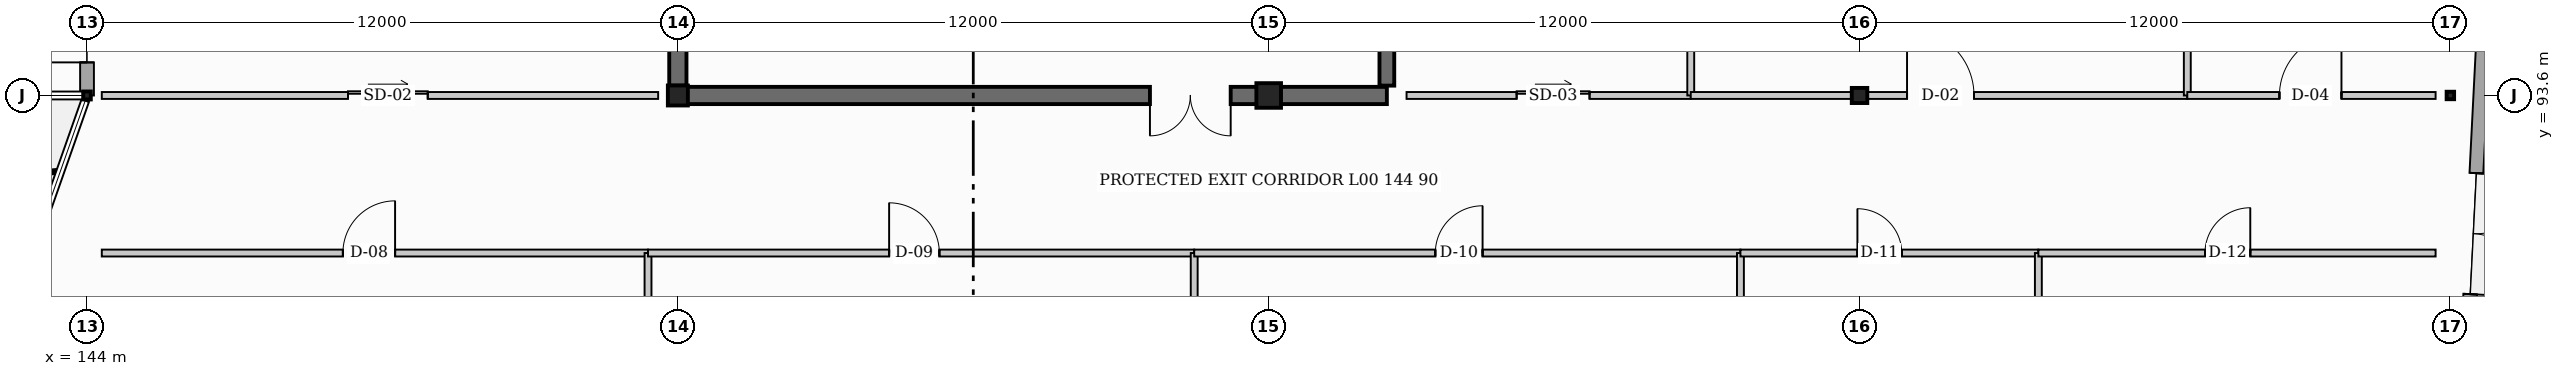
"""IFC4 building model, lengths in metres.
Left out: names, types, materials, properties, quantities, classifications, styles, units other than length and angle.
Written with IfcOpenShell. Run it as: python <this file> out.ifc"""

import sys

from ifc_helpers import new_model, si_unit, direction, frame, frame_2d, origin, origin_2d, place, context, subcontext, project, spatial, rectangle, hollow_circle, i_section, extrude, element, fill, save


model = new_model("IFC4")
c1 = context("Model", 3, precision=1e-05, world=origin(), true_north=direction((0.0, 1.0)))
c2 = subcontext(c1, "Body", "Model", "MODEL_VIEW")
j1 = project(units=[si_unit("LENGTHUNIT", "METRE"), si_unit("PLANEANGLEUNIT", "RADIAN")], contexts=[c1])
p1 = place(None, origin())
s1 = spatial("IfcSite", under=j1, at=p1, CompositionType="ELEMENT")
p2 = place(p1, origin())
s2 = spatial("IfcBuilding", under=s1, at=p2, CompositionType="ELEMENT")
p3 = place(p2, origin())
s3 = spatial("IfcBuildingStorey", under=s2, at=p3, CompositionType="ELEMENT", Elevation=0.0)
p4 = place(p3, frame((144.0, 93.6, 0.0), z_axis=(0.0, 0.0, 1.0), x_axis=(1.0, 0.0, 0.0)))
e1 = element("IfcColumn", 1, at=p4, inside=s3, PredefinedType="COLUMN", context=c2, shape_type="SweptSolid", body=[
    extrude(i_section(OverallWidth=0.154, OverallDepth=0.162, WebThickness=0.008, FlangeThickness=0.011, at=origin_2d()), origin(), (0.0, 0.0, 1.0), 4.8),
])
p5 = place(p3, frame((156.0, 93.6, 0.0), z_axis=(0.0, 0.0, 1.0), x_axis=(0.0, 1.0, 0.0)))
e2 = element("IfcColumn", 2, at=p5, inside=s3, PredefinedType="COLUMN", context=c2, shape_type="SweptSolid", body=[
    extrude(hollow_circle(Radius=0.203, WallThickness=0.016, at=origin_2d()), origin(), (0.0, 0.0, 1.0), 4.8),
])
p6 = place(p3, frame((168.0, 93.6, 0.0), z_axis=(0.0, 0.0, 1.0), x_axis=(1.0, 0.0, 0.0)))
e3 = element("IfcColumn", 3, at=p6, inside=s3, PredefinedType="COLUMN", context=c2, shape_type="SweptSolid", body=[
    extrude(rectangle(XDim=0.5, YDim=0.5, at=origin_2d()), origin(), (0.0, 0.0, 1.0), 4.8),
])
p7 = place(p3, frame((180.0, 93.6, 0.0), z_axis=(0.0, 0.0, 1.0), x_axis=(0.0, 1.0, 0.0)))
e4 = element("IfcColumn", 4, at=p7, inside=s3, PredefinedType="COLUMN", context=c2, shape_type="SweptSolid", body=[
    extrude(i_section(OverallWidth=0.307, OverallDepth=0.315, WebThickness=0.012, FlangeThickness=0.019, at=origin_2d()), origin(), (0.0, 0.0, 1.0), 4.8),
])
p8 = place(p3, frame((192.0, 93.6, 0.0), z_axis=(0.0, 0.0, 1.0), x_axis=(1.0, 0.0, 0.0)))
e5 = element("IfcColumn", 5, at=p8, inside=s3, PredefinedType="COLUMN", context=c2, shape_type="SweptSolid", body=[
    extrude(i_section(OverallWidth=0.152, OverallDepth=0.152, WebThickness=0.006, FlangeThickness=0.007, at=origin_2d()), origin(), (0.0, 0.0, 1.0), 4.8),
])
p9 = place(p3, frame((170.4, 93.6, 0.0), z_axis=(0.0, 0.0, 1.0), x_axis=(-1.0, 0.0, 0.0)))
e6 = element("IfcWall", 6, at=p9, inside=s3, PredefinedType="SHEAR", context=c2, shape_type="SweptSolid", body=[
    extrude(rectangle(XDim=14.4, YDim=0.35, at=frame_2d((7.2, 0.0))), origin(), (0.0, 0.0, 1.0), 4.8),
])
p10 = place(p9, frame((3.172, 0.0, 0.0)))
e7 = element("IfcOpeningElement", 7, at=p10, cuts=e6, PredefinedType="OPENING", context=c2, shape_type="SweptSolid", body=[
    extrude(rectangle(XDim=1.64, YDim=2.2, at=frame_2d((0.82, 1.1))), frame((0.0, 0.185, 0.0), z_axis=(0.0, -1.0, 0.0), x_axis=(1.0, 0.0, 0.0)), (0.0, 0.0, 1.0), 0.37),
])
p11 = place(p3, frame((156.0, 93.8, 0.0), z_axis=(0.0, 0.0, 1.0), x_axis=(0.0, 1.0, 0.0)))
e8 = element("IfcWall", 8, at=p11, inside=s3, PredefinedType="SHEAR", context=c2, shape_type="SweptSolid", body=[
    extrude(rectangle(XDim=8.0, YDim=0.35, at=frame_2d((4.0, 0.0))), origin(), (0.0, 0.0, 1.0), 4.8),
])
p12 = place(p3, frame((170.4, 101.8, 0.0), z_axis=(0.0, 0.0, 1.0), x_axis=(0.0, -1.0, 0.0)))
e9 = element("IfcWall", 9, at=p12, inside=s3, PredefinedType="SHEAR", context=c2, shape_type="SweptSolid", body=[
    extrude(rectangle(XDim=8.0, YDim=0.3, at=frame_2d((4.0, 0.0))), origin(), (0.0, 0.0, 1.0), 4.8),
])
p13 = place(p3, frame((193.4, 109.2, 0.0), z_axis=(0.0, 0.0, 1.0), x_axis=(-0.050656249881, -0.998716148036, 0.0)))
e10 = element("IfcWall", 10, at=p13, inside=s3, PredefinedType="STANDARD", context=c2, shape_type="SweptSolid", body=[
    extrude(rectangle(XDim=27.635, YDim=0.28, at=frame_2d((13.818, 0.0))), origin(), (0.0, 0.0, 1.0), 3.973),
])
p14 = place(p13, frame((17.2, 0.0, 0.0)))
e11 = element("IfcOpeningElement", 11, at=p14, cuts=e10, PredefinedType="OPENING", context=c2, shape_type="SweptSolid", body=[
    extrude(rectangle(XDim=2.46, YDim=2.4, at=frame_2d((1.23, 1.2))), frame((0.0, 0.15, 0.0), z_axis=(0.0, -1.0, 0.0), x_axis=(1.0, 0.0, 0.0)), (0.0, 0.0, 1.0), 0.3),
])
p15 = place(p13, frame((1.1, 0.0, 0.95)))
e12 = element("IfcOpeningElement", 12, at=p15, cuts=e10, PredefinedType="OPENING", context=c2, shape_type="SweptSolid", body=[
    extrude(rectangle(XDim=0.9, YDim=1.8, at=frame_2d((0.45, 0.9))), frame((0.0, 0.15, 0.0), z_axis=(0.0, -1.0, 0.0), x_axis=(1.0, 0.0, 0.0)), (0.0, 0.0, 1.0), 0.3),
])
p16 = place(p13, frame((4.7, 0.0, 0.95)))
e13 = element("IfcOpeningElement", 13, at=p16, cuts=e10, PredefinedType="OPENING", context=c2, shape_type="SweptSolid", body=[
    extrude(rectangle(XDim=0.9, YDim=1.8, at=frame_2d((0.45, 0.9))), frame((0.0, 0.15, 0.0), z_axis=(0.0, -1.0, 0.0), x_axis=(1.0, 0.0, 0.0)), (0.0, 0.0, 1.0), 0.3),
])
p17 = place(p13, frame((8.3, 0.0, 0.95)))
e14 = element("IfcOpeningElement", 14, at=p17, cuts=e10, PredefinedType="OPENING", context=c2, shape_type="SweptSolid", body=[
    extrude(rectangle(XDim=0.9, YDim=1.8, at=frame_2d((0.45, 0.9))), frame((0.0, 0.15, 0.0), z_axis=(0.0, -1.0, 0.0), x_axis=(1.0, 0.0, 0.0)), (0.0, 0.0, 1.0), 0.3),
])
p18 = place(p13, frame((11.9, 0.0, 0.95)))
e15 = element("IfcOpeningElement", 15, at=p18, cuts=e10, PredefinedType="OPENING", context=c2, shape_type="SweptSolid", body=[
    extrude(rectangle(XDim=0.9, YDim=1.8, at=frame_2d((0.45, 0.9))), frame((0.0, 0.15, 0.0), z_axis=(0.0, -1.0, 0.0), x_axis=(1.0, 0.0, 0.0)), (0.0, 0.0, 1.0), 0.3),
])
p19 = place(p13, frame((22.7, 0.0, 0.95)))
e16 = element("IfcOpeningElement", 16, at=p19, cuts=e10, PredefinedType="OPENING", context=c2, shape_type="SweptSolid", body=[
    extrude(rectangle(XDim=0.9, YDim=1.8, at=frame_2d((0.45, 0.9))), frame((0.0, 0.15, 0.0), z_axis=(0.0, -1.0, 0.0), x_axis=(1.0, 0.0, 0.0)), (0.0, 0.0, 1.0), 0.3),
])
p20 = place(p3, frame((144.0, 93.6, 0.0), z_axis=(0.0, 0.0, 1.0), x_axis=(0.0, 1.0, 0.0)))
e17 = element("IfcWall", 17, at=p20, inside=s3, PredefinedType="STANDARD", context=c2, shape_type="SweptSolid", body=[
    extrude(rectangle(XDim=21.6, YDim=0.28, at=frame_2d((10.8, 0.0))), origin(), (0.0, 0.0, 1.0), 3.48),
])
p21 = place(p20, frame((0.672, 0.0, 0.0)))
e18 = element("IfcOpeningElement", 18, at=p21, cuts=e17, PredefinedType="OPENING", context=c2, shape_type="SweptSolid", body=[
    extrude(rectangle(XDim=2.3, YDim=2.3, at=frame_2d((1.15, 1.15))), frame((0.0, 0.15, 0.0), z_axis=(0.0, -1.0, 0.0), x_axis=(1.0, 0.0, 0.0)), (0.0, 0.0, 1.0), 0.3),
])
p22 = place(p3, frame((144.3, 90.4, 0.0), z_axis=(0.0, 0.0, 1.0), x_axis=(1.0, 0.0, 0.0)))
e19 = element("IfcWall", 19, at=p22, inside=s3, PredefinedType="PARTITIONING", context=c2, shape_type="SweptSolid", body=[
    extrude(rectangle(XDim=11.094, YDim=0.14, at=frame_2d((5.547, 0.0))), origin(), (0.0, 0.0, 1.0), 3.973),
])
p23 = place(p22, frame((4.897, 0.0, 0.0)))
e20 = element("IfcOpeningElement", 20, at=p23, cuts=e19, PredefinedType="OPENING", context=c2, shape_type="SweptSolid", body=[
    extrude(rectangle(XDim=1.06, YDim=2.1, at=frame_2d((0.53, 1.05))), frame((0.0, 0.08, 0.0), z_axis=(0.0, -1.0, 0.0), x_axis=(1.0, 0.0, 0.0)), (0.0, 0.0, 1.0), 0.16),
])
p24 = place(p3, frame((155.394, 87.65, 0.0), z_axis=(0.0, 0.0, 1.0), x_axis=(0.0, 1.0, 0.0)))
e21 = element("IfcWall", 21, at=p24, inside=s3, PredefinedType="PARTITIONING", context=c2, shape_type="SweptSolid", body=[
    extrude(rectangle(XDim=2.75, YDim=0.14, at=frame_2d((1.375, 0.0))), origin(), (0.0, 0.0, 1.0), 4.445),
])
p25 = place(p3, frame((155.394, 90.4, 0.0), z_axis=(0.0, 0.0, 1.0), x_axis=(1.0, 0.0, 0.0)))
e22 = element("IfcWall", 22, at=p25, inside=s3, PredefinedType="PARTITIONING", context=c2, shape_type="SweptSolid", body=[
    extrude(rectangle(XDim=11.093, YDim=0.14, at=frame_2d((5.546, 0.0))), origin(), (0.0, 0.0, 1.0), 4.445),
])
p26 = place(p25, frame((4.897, 0.0, 0.0)))
e23 = element("IfcOpeningElement", 23, at=p26, cuts=e22, PredefinedType="OPENING", context=c2, shape_type="SweptSolid", body=[
    extrude(rectangle(XDim=1.02, YDim=2.08, at=frame_2d((0.51, 1.04))), frame((0.0, 0.08, 0.0), z_axis=(0.0, -1.0, 0.0), x_axis=(1.0, 0.0, 0.0)), (0.0, 0.0, 1.0), 0.16),
])
p27 = place(p3, frame((166.487, 81.9, 0.0), z_axis=(0.0, 0.0, 1.0), x_axis=(0.0, 1.0, 0.0)))
e24 = element("IfcWall", 24, at=p27, inside=s3, PredefinedType="PARTITIONING", context=c2, shape_type="SweptSolid", body=[
    extrude(rectangle(XDim=8.5, YDim=0.14, at=frame_2d((4.25, 0.0))), origin(), (0.0, 0.0, 1.0), 3.902),
])
p28 = place(p3, frame((166.487, 90.4, 0.0), z_axis=(0.0, 0.0, 1.0), x_axis=(1.0, 0.0, 0.0)))
e25 = element("IfcWall", 25, at=p28, inside=s3, PredefinedType="PARTITIONING", context=c2, shape_type="SweptSolid", body=[
    extrude(rectangle(XDim=11.094, YDim=0.14, at=frame_2d((5.547, 0.0))), origin(), (0.0, 0.0, 1.0), 3.48),
])
p29 = place(p28, frame((4.897, 0.0, 0.0)))
e26 = element("IfcOpeningElement", 26, at=p29, cuts=e25, PredefinedType="OPENING", context=c2, shape_type="SweptSolid", body=[
    extrude(rectangle(XDim=0.96, YDim=2.06, at=frame_2d((0.48, 1.03))), frame((0.0, 0.08, 0.0), z_axis=(0.0, -1.0, 0.0), x_axis=(1.0, 0.0, 0.0)), (0.0, 0.0, 1.0), 0.16),
])
p30 = place(p3, frame((177.581, 81.9, 0.0), z_axis=(0.0, 0.0, 1.0), x_axis=(0.0, 1.0, 0.0)))
e27 = element("IfcWall", 27, at=p30, inside=s3, PredefinedType="PARTITIONING", context=c2, shape_type="SweptSolid", body=[
    extrude(rectangle(XDim=8.5, YDim=0.14, at=frame_2d((4.25, 0.0))), origin(), (0.0, 0.0, 1.0), 3.97),
])
p31 = place(p3, frame((177.581, 90.4, 0.0), z_axis=(0.0, 0.0, 1.0), x_axis=(1.0, 0.0, 0.0)))
e28 = element("IfcWall", 28, at=p31, inside=s3, PredefinedType="PARTITIONING", context=c2, shape_type="SweptSolid", body=[
    extrude(rectangle(XDim=6.051, YDim=0.14, at=frame_2d((3.025, 0.0))), origin(), (0.0, 0.0, 1.0), 3.53),
])
p32 = place(p31, frame((2.376, 0.0, 0.0)))
e29 = element("IfcOpeningElement", 29, at=p32, cuts=e28, PredefinedType="OPENING", context=c2, shape_type="SweptSolid", body=[
    extrude(rectangle(XDim=0.9, YDim=2.1, at=frame_2d((0.45, 1.05))), frame((0.0, 0.08, 0.0), z_axis=(0.0, -1.0, 0.0), x_axis=(1.0, 0.0, 0.0)), (0.0, 0.0, 1.0), 0.16),
])
p33 = place(p3, frame((183.632, 81.9, 0.0), z_axis=(0.0, 0.0, 1.0), x_axis=(0.0, 1.0, 0.0)))
e30 = element("IfcWall", 30, at=p33, inside=s3, PredefinedType="PARTITIONING", context=c2, shape_type="SweptSolid", body=[
    extrude(rectangle(XDim=8.5, YDim=0.14, at=frame_2d((4.25, 0.0))), origin(), (0.0, 0.0, 1.0), 3.973),
])
p34 = place(p3, frame((183.632, 90.4, 0.0), z_axis=(0.0, 0.0, 1.0), x_axis=(1.0, 0.0, 0.0)))
e31 = element("IfcWall", 31, at=p34, inside=s3, PredefinedType="PARTITIONING", context=c2, shape_type="SweptSolid", body=[
    extrude(rectangle(XDim=8.068, YDim=0.14, at=frame_2d((4.034, 0.0))), origin(), (0.0, 0.0, 1.0), 4.18),
])
p35 = place(p34, frame((3.384, 0.0, 0.0)))
e32 = element("IfcOpeningElement", 32, at=p35, cuts=e31, PredefinedType="OPENING", context=c2, shape_type="SweptSolid", body=[
    extrude(rectangle(XDim=0.92, YDim=2.04, at=frame_2d((0.46, 1.02))), frame((0.0, 0.08, 0.0), z_axis=(0.0, -1.0, 0.0), x_axis=(1.0, 0.0, 0.0)), (0.0, 0.0, 1.0), 0.16),
])
p36 = place(p3, frame((144.3, 93.6, 0.0), z_axis=(0.0, 0.0, 1.0), x_axis=(1.0, 0.0, 0.0)))
e33 = element("IfcWall", 33, at=p36, inside=s3, PredefinedType="PARTITIONING", context=c2, shape_type="SweptSolid", body=[
    extrude(rectangle(XDim=11.3, YDim=0.14, at=frame_2d((5.65, 0.0))), origin(), (0.0, 0.0, 1.0), 3.897),
])
p37 = place(p36, frame((5.0, 0.0, 0.0)))
e34 = element("IfcOpeningElement", 34, at=p37, cuts=e33, PredefinedType="OPENING", context=c2, shape_type="SweptSolid", body=[
    extrude(rectangle(XDim=1.62, YDim=2.3, at=frame_2d((0.81, 1.15))), frame((0.0, 0.08, 0.0), z_axis=(0.0, -1.0, 0.0), x_axis=(1.0, 0.0, 0.0)), (0.0, 0.0, 1.0), 0.16),
])
p38 = place(p3, frame((170.8, 93.6, 0.0), z_axis=(0.0, 0.0, 1.0), x_axis=(1.0, 0.0, 0.0)))
e35 = element("IfcWall", 35, at=p38, inside=s3, PredefinedType="PARTITIONING", context=c2, shape_type="SweptSolid", body=[
    extrude(rectangle(XDim=5.772, YDim=0.14, at=frame_2d((2.886, 0.0))), origin(), (0.0, 0.0, 1.0), 3.973),
])
p39 = place(p38, frame((2.236, 0.0, 0.0)))
e36 = element("IfcOpeningElement", 36, at=p39, cuts=e35, PredefinedType="OPENING", context=c2, shape_type="SweptSolid", body=[
    extrude(rectangle(XDim=1.48, YDim=2.26, at=frame_2d((0.74, 1.13))), frame((0.0, 0.08, 0.0), z_axis=(0.0, -1.0, 0.0), x_axis=(1.0, 0.0, 0.0)), (0.0, 0.0, 1.0), 0.16),
])
p40 = place(p3, frame((176.572, 93.6, 0.0), z_axis=(0.0, 0.0, 1.0), x_axis=(0.0, 1.0, 0.0)))
e37 = element("IfcWall", 37, at=p40, inside=s3, PredefinedType="PARTITIONING", context=c2, shape_type="SweptSolid", body=[
    extrude(rectangle(XDim=32.1, YDim=0.14, at=frame_2d((16.05, 0.0))), origin(), (0.0, 0.0, 1.0), 3.48),
])
p41 = place(p3, frame((176.572, 93.6, 0.0), z_axis=(0.0, 0.0, 1.0), x_axis=(1.0, 0.0, 0.0)))
e38 = element("IfcWall", 38, at=p41, inside=s3, PredefinedType="PARTITIONING", context=c2, shape_type="SweptSolid", body=[
    extrude(rectangle(XDim=10.085, YDim=0.14, at=frame_2d((5.042, 0.0))), origin(), (0.0, 0.0, 1.0), 3.53),
])
p42 = place(p41, frame((4.393, 0.0, 0.0)))
e39 = element("IfcOpeningElement", 39, at=p42, cuts=e38, PredefinedType="OPENING", context=c2, shape_type="SweptSolid", body=[
    extrude(rectangle(XDim=1.36, YDim=2.18, at=frame_2d((0.68, 1.09))), frame((0.0, 0.08, 0.0), z_axis=(0.0, -1.0, 0.0), x_axis=(1.0, 0.0, 0.0)), (0.0, 0.0, 1.0), 0.16),
])
p43 = place(p3, frame((186.657, 93.6, 0.0), z_axis=(0.0, 0.0, 1.0), x_axis=(0.0, 1.0, 0.0)))
e40 = element("IfcWall", 40, at=p43, inside=s3, PredefinedType="PARTITIONING", context=c2, shape_type="SweptSolid", body=[
    extrude(rectangle(XDim=32.1, YDim=0.14, at=frame_2d((16.05, 0.0))), origin(), (0.0, 0.0, 1.0), 3.48),
])
p44 = place(p3, frame((186.657, 93.6, 0.0), z_axis=(0.0, 0.0, 1.0), x_axis=(1.0, 0.0, 0.0)))
e41 = element("IfcWall", 41, at=p44, inside=s3, PredefinedType="PARTITIONING", context=c2, shape_type="SweptSolid", body=[
    extrude(rectangle(XDim=5.043, YDim=0.14, at=frame_2d((2.521, 0.0))), origin(), (0.0, 0.0, 1.0), 3.976),
])
p45 = place(p44, frame((1.871, 0.0, 0.0)))
e42 = element("IfcOpeningElement", 42, at=p45, cuts=e41, PredefinedType="OPENING", context=c2, shape_type="SweptSolid", body=[
    extrude(rectangle(XDim=1.26, YDim=2.14, at=frame_2d((0.63, 1.07))), frame((0.0, 0.08, 0.0), z_axis=(0.0, -1.0, 0.0), x_axis=(1.0, 0.0, 0.0)), (0.0, 0.0, 1.0), 0.16),
])
p46 = place(p14, origin())
e43 = element("IfcDoor", 43, at=p46, inside=s3, OperationType="DOUBLE_DOOR_SINGLE_SWING", PredefinedType="DOOR", context=c2, shape_type="SweptSolid", body=[
    extrude(rectangle(XDim=2.46, YDim=2.4, at=frame_2d((1.23, 1.2))), frame((0.0, 0.025, 0.0), z_axis=(0.0, -1.0, 0.0), x_axis=(1.0, 0.0, 0.0)), (0.0, 0.0, 1.0), 0.05),
])
fill(e11, e43)
p47 = place(p21, origin())
e44 = element("IfcDoor", 44, at=p47, inside=s3, OperationType="DOUBLE_DOOR_SINGLE_SWING", PredefinedType="DOOR", context=c2, shape_type="SweptSolid", body=[
    extrude(rectangle(XDim=2.3, YDim=2.3, at=frame_2d((1.15, 1.15))), frame((0.0, 0.025, 0.0), z_axis=(0.0, -1.0, 0.0), x_axis=(1.0, 0.0, 0.0)), (0.0, 0.0, 1.0), 0.05),
])
fill(e18, e44)
p48 = place(p10, origin())
e45 = element("IfcDoor", 45, at=p48, inside=s3, OperationType="DOUBLE_DOOR_SINGLE_SWING", PredefinedType="DOOR", context=c2, shape_type="SweptSolid", body=[
    extrude(rectangle(XDim=1.64, YDim=2.2, at=frame_2d((0.82, 1.1))), frame((0.0, 0.025, 0.0), z_axis=(0.0, -1.0, 0.0), x_axis=(1.0, 0.0, 0.0)), (0.0, 0.0, 1.0), 0.05),
])
fill(e7, e45)
p49 = place(p23, origin())
e46 = element("IfcDoor", 46, at=p49, inside=s3, OperationType="SINGLE_SWING_RIGHT", PredefinedType="DOOR", context=c2, shape_type="SweptSolid", body=[
    extrude(rectangle(XDim=1.06, YDim=2.1, at=frame_2d((0.53, 1.05))), frame((0.0, 0.025, 0.0), z_axis=(0.0, -1.0, 0.0), x_axis=(1.0, 0.0, 0.0)), (0.0, 0.0, 1.0), 0.05),
])
fill(e20, e46)
p50 = place(p26, origin())
e47 = element("IfcDoor", 47, at=p50, inside=s3, OperationType="SINGLE_SWING_LEFT", PredefinedType="DOOR", context=c2, shape_type="SweptSolid", body=[
    extrude(rectangle(XDim=1.02, YDim=2.08, at=frame_2d((0.51, 1.04))), frame((0.0, 0.025, 0.0), z_axis=(0.0, -1.0, 0.0), x_axis=(1.0, 0.0, 0.0)), (0.0, 0.0, 1.0), 0.05),
])
fill(e23, e47)
p51 = place(p29, origin())
e48 = element("IfcDoor", 48, at=p51, inside=s3, OperationType="SINGLE_SWING_RIGHT", PredefinedType="DOOR", context=c2, shape_type="SweptSolid", body=[
    extrude(rectangle(XDim=0.96, YDim=2.06, at=frame_2d((0.48, 1.03))), frame((0.0, 0.025, 0.0), z_axis=(0.0, -1.0, 0.0), x_axis=(1.0, 0.0, 0.0)), (0.0, 0.0, 1.0), 0.05),
])
fill(e26, e48)
p52 = place(p32, origin())
e49 = element("IfcDoor", 49, at=p52, inside=s3, OperationType="SINGLE_SWING_LEFT", PredefinedType="DOOR", context=c2, shape_type="SweptSolid", body=[
    extrude(rectangle(XDim=0.9, YDim=2.1, at=frame_2d((0.45, 1.05))), frame((0.0, 0.025, 0.0), z_axis=(0.0, -1.0, 0.0), x_axis=(1.0, 0.0, 0.0)), (0.0, 0.0, 1.0), 0.05),
])
fill(e29, e49)
p53 = place(p35, origin())
e50 = element("IfcDoor", 50, at=p53, inside=s3, OperationType="SINGLE_SWING_RIGHT", PredefinedType="DOOR", context=c2, shape_type="SweptSolid", body=[
    extrude(rectangle(XDim=0.92, YDim=2.04, at=frame_2d((0.46, 1.02))), frame((0.0, 0.025, 0.0), z_axis=(0.0, -1.0, 0.0), x_axis=(1.0, 0.0, 0.0)), (0.0, 0.0, 1.0), 0.05),
])
fill(e32, e50)
p54 = place(p37, origin())
e51 = element("IfcDoor", 51, at=p54, inside=s3, OperationType="SLIDING_TO_RIGHT", PredefinedType="DOOR", context=c2, shape_type="SweptSolid", body=[
    extrude(rectangle(XDim=1.62, YDim=2.3, at=frame_2d((0.81, 1.15))), frame((0.0, 0.025, 0.0), z_axis=(0.0, -1.0, 0.0), x_axis=(1.0, 0.0, 0.0)), (0.0, 0.0, 1.0), 0.05),
])
fill(e34, e51)
p55 = place(p39, origin())
e52 = element("IfcDoor", 52, at=p55, inside=s3, OperationType="SLIDING_TO_LEFT", PredefinedType="DOOR", context=c2, shape_type="SweptSolid", body=[
    extrude(rectangle(XDim=1.48, YDim=2.26, at=frame_2d((0.74, 1.13))), frame((0.0, 0.025, 0.0), z_axis=(0.0, -1.0, 0.0), x_axis=(1.0, 0.0, 0.0)), (0.0, 0.0, 1.0), 0.05),
])
fill(e36, e52)
p56 = place(p42, origin())
e53 = element("IfcDoor", 53, at=p56, inside=s3, OperationType="SINGLE_SWING_LEFT", PredefinedType="DOOR", context=c2, shape_type="SweptSolid", body=[
    extrude(rectangle(XDim=1.36, YDim=2.18, at=frame_2d((0.68, 1.09))), frame((0.0, 0.025, 0.0), z_axis=(0.0, -1.0, 0.0), x_axis=(1.0, 0.0, 0.0)), (0.0, 0.0, 1.0), 0.05),
])
fill(e39, e53)
p57 = place(p45, origin())
e54 = element("IfcDoor", 54, at=p57, inside=s3, OperationType="SINGLE_SWING_RIGHT", PredefinedType="DOOR", context=c2, shape_type="SweptSolid", body=[
    extrude(rectangle(XDim=1.26, YDim=2.14, at=frame_2d((0.63, 1.07))), frame((0.0, 0.025, 0.0), z_axis=(0.0, -1.0, 0.0), x_axis=(1.0, 0.0, 0.0)), (0.0, 0.0, 1.0), 0.05),
])
fill(e42, e54)
save(model, sys.argv[1])
